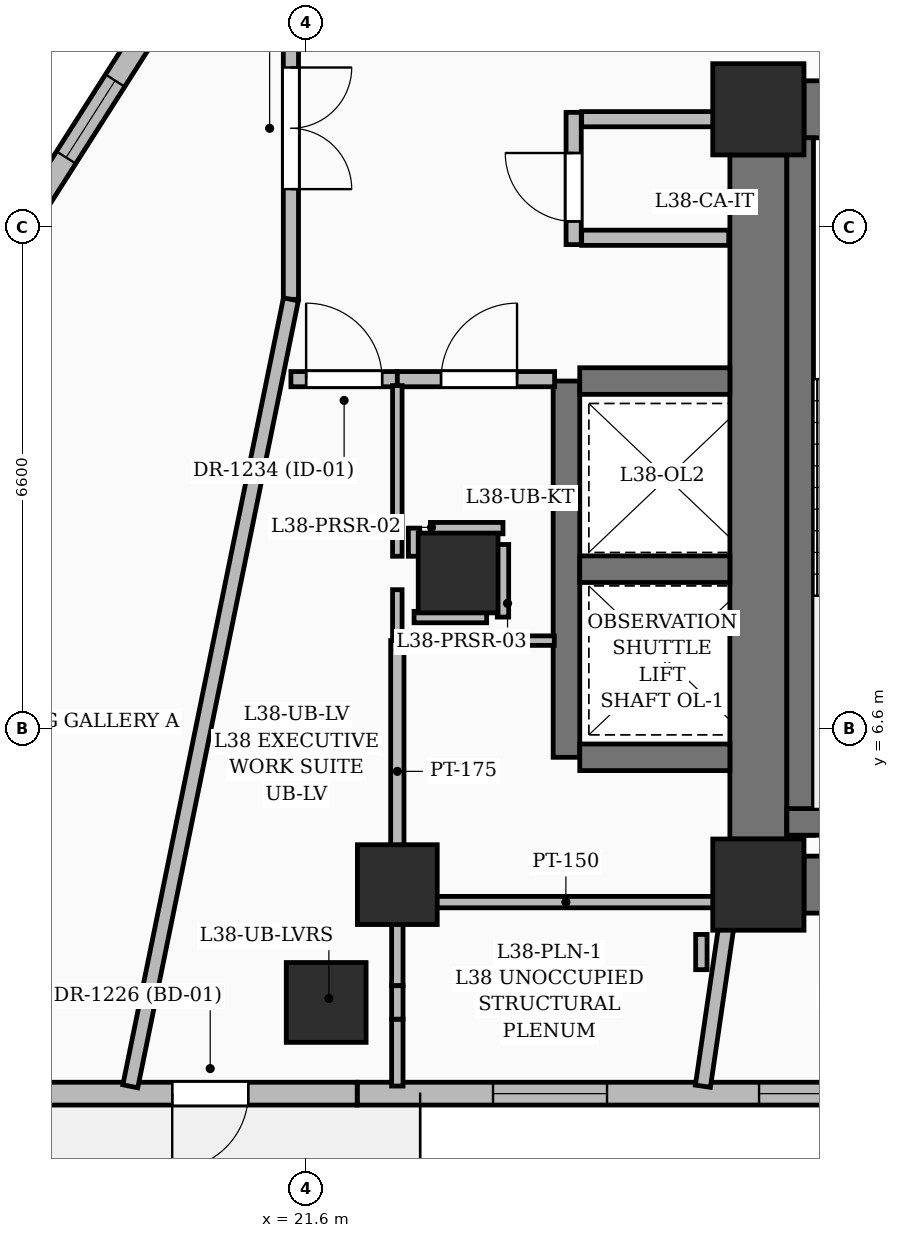
"""IFC4 building model, lengths in metres.
Left out: names, types, materials, properties, quantities, classifications, styles, units other than length and angle.
Written with IfcOpenShell. Run it as: python <this file> out.ifc"""

import sys

from ifc_helpers import new_model, si_unit, direction, frame, frame_2d, origin, origin_2d, place, context, subcontext, project, spatial, rectangle, extrude, element, fill, save


model = new_model("IFC4")
c1 = context("Model", 3, precision=1e-05, world=origin(), true_north=direction((0.0, 1.0)))
c2 = subcontext(c1, "Body", "Model", "MODEL_VIEW")
j1 = project(units=[si_unit("LENGTHUNIT", "METRE"), si_unit("PLANEANGLEUNIT", "RADIAN")], contexts=[c1])
p1 = place(None, origin())
s1 = spatial("IfcSite", under=j1, at=p1, CompositionType="ELEMENT")
p2 = place(p1, origin())
s2 = spatial("IfcBuilding", under=s1, at=p2, CompositionType="ELEMENT")
p3 = place(p2, frame((0.0, 0.0, 150.0)))
s3 = spatial("IfcBuildingStorey", under=s2, at=p3, CompositionType="ELEMENT", Elevation=150.0)
for number, where, z_axis, x_axis in (
    (1, (27.55, 4.55, 0.0), (0.0, 0.0, 1.0), (1.0, 0.0, 0.0)),
    (2, (27.55, 14.75, 0.0), (0.0, 0.0, 1.0), (1.0, 0.0, 0.0)),
):
    element("IfcColumn", number, at=place(p3, frame(where, z_axis=z_axis, x_axis=x_axis)), inside=s3, PredefinedType="COLUMN", context=c2, shape_type="SweptSolid", body=[
        extrude(rectangle(XDim=1.2, YDim=1.2, at=origin_2d()), origin(), (0.0, 0.0, 1.0), 3.6),
    ])
for number, where, z_axis, x_axis in (
    (3, (22.8, 4.55, 0.0), (0.0, 0.0, 1.0), (1.0, 0.0, 0.0)),
    (4, (23.6, 8.65, 0.0), (0.0, 0.0, 1.0), (1.0, 0.0, 0.0)),
):
    element("IfcColumn", number, at=place(p3, frame(where, z_axis=z_axis, x_axis=x_axis)), inside=s3, PredefinedType="COLUMN", context=c2, shape_type="SweptSolid", body=[
        extrude(rectangle(XDim=1.05, YDim=1.05, at=origin_2d()), origin(), (0.0, 0.0, 1.0), 3.6),
    ])
p4 = place(p3, frame((28.15, 4.55, 0.0), z_axis=(0.0, 0.0, 1.0), x_axis=(1.0, 0.0, 0.0)))
e5 = element("IfcWall", 5, at=p4, inside=s3, PredefinedType="SHEAR", context=c2, shape_type="SweptSolid", body=[
    extrude(rectangle(XDim=6.4, YDim=0.75, at=frame_2d((3.2, 0.0))), origin(), (0.0, 0.0, 1.0), 3.6),
])
p5 = place(p3, frame((28.15, 14.75, 0.0), z_axis=(0.0, 0.0, 1.0), x_axis=(1.0, 0.0, 0.0)))
e6 = element("IfcWall", 6, at=p5, inside=s3, PredefinedType="SHEAR", context=c2, shape_type="SweptSolid", body=[
    extrude(rectangle(XDim=6.4, YDim=0.75, at=frame_2d((3.2, 0.0))), origin(), (0.0, 0.0, 1.0), 3.6),
])
p6 = place(p5, frame((1.025, 0.0, 0.0)))
e7 = element("IfcOpeningElement", 7, at=p6, cuts=e6, PredefinedType="OPENING", context=c2, shape_type="SweptSolid", body=[
    extrude(rectangle(XDim=1.05, YDim=2.15, at=frame_2d((0.525, 1.075))), frame((0.0, 0.385, 0.0), z_axis=(0.0, -1.0, 0.0), x_axis=(1.0, 0.0, 0.0)), (0.0, 0.0, 1.0), 0.77),
])
p7 = place(p5, frame((3.8, 0.0, 0.0)))
e8 = element("IfcOpeningElement", 8, at=p7, cuts=e6, PredefinedType="OPENING", context=c2, shape_type="SweptSolid", body=[
    extrude(rectangle(XDim=1.1, YDim=2.2, at=frame_2d((0.55, 1.1))), frame((0.0, 0.385, 0.0), z_axis=(0.0, -1.0, 0.0), x_axis=(1.0, 0.0, 0.0)), (0.0, 0.0, 1.0), 0.77),
])
p8 = place(p3, frame((27.55, 5.15, 0.0), z_axis=(0.0, 0.0, 1.0), x_axis=(0.0, 1.0, 0.0)))
e9 = element("IfcWall", 9, at=p8, inside=s3, PredefinedType="SHEAR", context=c2, shape_type="SweptSolid", body=[
    extrude(rectangle(XDim=9.0, YDim=0.75, at=frame_2d((4.5, 0.0))), origin(), (0.0, 0.0, 1.0), 3.6),
])
p9 = place(p3, frame((28.1, 5.2, 0.0), z_axis=(0.0, 0.0, 1.0), x_axis=(0.0, 1.0, 0.0)))
e10 = element("IfcWall", 10, at=p9, inside=s3, PredefinedType="SOLIDWALL", context=c2, shape_type="SweptSolid", body=[
    extrude(rectangle(XDim=9.175, YDim=0.35, at=frame_2d((4.587, 0.0))), origin(), (0.0, 0.0, 1.0), 3.6),
])
p10 = place(p3, frame((27.925, 5.375, 0.0), z_axis=(0.0, 0.0, 1.0), x_axis=(1.0, 0.0, 0.0)))
e11 = element("IfcWall", 11, at=p10, inside=s3, PredefinedType="SOLIDWALL", context=c2, shape_type="SweptSolid", body=[
    extrude(rectangle(XDim=3.55, YDim=0.35, at=frame_2d((1.775, 0.0))), origin(), (0.0, 0.0, 1.0), 3.6),
])
p11 = place(p3, frame((25.025, 6.225, 0.0), z_axis=(0.0, 0.0, 1.0), x_axis=(0.0, 1.0, 0.0)))
e12 = element("IfcWall", 12, at=p11, inside=s3, PredefinedType="SOLIDWALL", context=c2, shape_type="SweptSolid", body=[
    extrude(rectangle(XDim=4.95, YDim=0.35, at=frame_2d((2.475, 0.0))), origin(), (0.0, 0.0, 1.0), 3.6),
])
for number, where, z_axis, x_axis in (
    (13, (25.2, 6.225, 0.0), (0.0, 0.0, 1.0), (1.0, 0.0, 0.0)),
    (14, (25.2, 8.7, 0.0), (0.0, 0.0, 1.0), (1.0, 0.0, 0.0)),
    (15, (25.2, 11.175, 0.0), (0.0, 0.0, 1.0), (1.0, 0.0, 0.0)),
):
    element("IfcWall", number, at=place(p3, frame(where, z_axis=z_axis, x_axis=x_axis)), inside=s3, PredefinedType="SOLIDWALL", context=c2, shape_type="SweptSolid", body=[
        extrude(rectangle(XDim=1.975, YDim=0.35, at=frame_2d((0.988, 0.0))), origin(), (0.0, 0.0, 1.0), 3.6),
    ])
p12 = place(p3, frame((21.864, 3.0, 0.0), z_axis=(0.0, 0.0, 1.0), x_axis=(1.0, 0.0, 0.0)))
e16 = element("IfcColumn", 16, at=p12, inside=s3, PredefinedType="COLUMN", context=c2, shape_type="SweptSolid", body=[
    extrude(rectangle(XDim=1.05, YDim=1.05, at=origin_2d()), origin(), (0.0, 0.0, 1.0), 3.6),
])
p13 = place(p3, frame((30.084, 1.8, 0.0), z_axis=(0.0, 0.0, 1.0), x_axis=(-1.0, 0.0, 0.0)))
e17 = element("IfcWall", 17, at=p13, inside=s3, PredefinedType="SOLIDWALL", context=c2, shape_type="SweptSolid", body=[
    extrude(rectangle(XDim=7.812, YDim=0.3, at=frame_2d((3.906, 0.0))), origin(), (0.0, 0.0, 1.0), 3.35),
])
p14 = place(p13, frame((4.525, 0.0, 0.6)))
e18 = element("IfcOpeningElement", 18, at=p14, cuts=e17, PredefinedType="OPENING", context=c2, shape_type="SweptSolid", body=[
    extrude(rectangle(XDim=1.5, YDim=2.1, at=frame_2d((0.75, 1.05))), frame((0.0, 0.16, 0.0), z_axis=(0.0, -1.0, 0.0), x_axis=(1.0, 0.0, 0.0)), (0.0, 0.0, 1.0), 0.32),
])
p15 = place(p13, frame((1.025, 0.0, 0.6)))
e19 = element("IfcOpeningElement", 19, at=p15, cuts=e17, PredefinedType="OPENING", context=c2, shape_type="SweptSolid", body=[
    extrude(rectangle(XDim=1.5, YDim=2.1, at=frame_2d((0.75, 1.05))), frame((0.0, 0.16, 0.0), z_axis=(0.0, -1.0, 0.0), x_axis=(1.0, 0.0, 0.0)), (0.0, 0.0, 1.0), 0.32),
])
p16 = place(p3, frame((22.272, 1.8, 0.0), z_axis=(0.0, 0.0, 1.0), x_axis=(-1.0, 0.0, 0.0)))
e20 = element("IfcWall", 20, at=p16, inside=s3, PredefinedType="SOLIDWALL", context=c2, shape_type="SweptSolid", body=[
    extrude(rectangle(XDim=7.812, YDim=0.3, at=frame_2d((3.906, 0.0))), origin(), (0.0, 0.0, 1.0), 3.35),
])
p17 = place(p16, frame((1.434, 0.0, 0.0)))
e21 = element("IfcOpeningElement", 21, at=p17, cuts=e20, PredefinedType="OPENING", context=c2, shape_type="SweptSolid", body=[
    extrude(rectangle(XDim=1.0, YDim=2.2, at=frame_2d((0.5, 1.1))), frame((0.0, 0.16, 0.0), z_axis=(0.0, -1.0, 0.0), x_axis=(1.0, 0.0, 0.0)), (0.0, 0.0, 1.0), 0.32),
])
p18 = place(p3, frame((17.006, 11.86, 0.0), z_axis=(0.0, 0.0, 1.0), x_axis=(0.537098524817, 0.843519516454, 0.0)))
e22 = element("IfcWall", 22, at=p18, inside=s3, PredefinedType="SOLIDWALL", context=c2, shape_type="SweptSolid", body=[
    extrude(rectangle(XDim=7.791, YDim=0.3, at=frame_2d((3.895, 0.0))), origin(), (0.0, 0.0, 1.0), 3.35),
])
p19 = place(p18, frame((2.675, 0.0, 0.8)))
e23 = element("IfcOpeningElement", 23, at=p19, cuts=e22, PredefinedType="OPENING", context=c2, shape_type="SweptSolid", body=[
    extrude(rectangle(XDim=1.2, YDim=1.8, at=frame_2d((0.6, 0.9))), frame((0.0, 0.16, 0.0), z_axis=(0.0, -1.0, 0.0), x_axis=(1.0, 0.0, 0.0)), (0.0, 0.0, 1.0), 0.32),
])
p20 = place(p3, frame((25.12, 12.97, 0.0), z_axis=(0.0, 0.0, 1.0), x_axis=(0.0, 1.0, 0.0)))
e24 = element("IfcWall", 24, at=p20, inside=s3, PredefinedType="PARTITIONING", context=c2, shape_type="SweptSolid", body=[
    extrude(rectangle(XDim=1.74, YDim=0.2, at=frame_2d((0.87, 0.0))), origin(), (0.0, 0.0, 1.0), 3.35),
])
p21 = place(p20, frame((0.305, 0.0, 0.0)))
e25 = element("IfcOpeningElement", 25, at=p21, cuts=e24, PredefinedType="OPENING", context=c2, shape_type="SweptSolid", body=[
    extrude(rectangle(XDim=0.9, YDim=2.1, at=frame_2d((0.45, 1.05))), frame((0.0, 0.11, 0.0), z_axis=(0.0, -1.0, 0.0), x_axis=(1.0, 0.0, 0.0)), (0.0, 0.0, 1.0), 0.22),
])
for number, where, z_axis, x_axis in (
    (26, (25.225, 14.62, 0.0), (0.0, 0.0, 1.0), (1.0, 0.0, 0.0)),
    (27, (25.225, 13.06, 0.0), (0.0, 0.0, 1.0), (1.0, 0.0, 0.0)),
):
    element("IfcWall", number, at=place(p3, frame(where, z_axis=z_axis, x_axis=x_axis)), inside=s3, PredefinedType="PARTITIONING", context=c2, shape_type="SweptSolid", body=[
        extrude(rectangle(XDim=1.935, YDim=0.2, at=frame_2d((0.967, 0.0))), origin(), (0.0, 0.0, 1.0), 3.35),
    ])
p22 = place(p3, frame((21.4, 16.75, 0.0), z_axis=(0.0, 0.0, 1.0), x_axis=(0.0, -1.0, 0.0)))
e28 = element("IfcWall", 28, at=p22, inside=s3, PredefinedType="PARTITIONING", context=c2, shape_type="SweptSolid", body=[
    extrude(rectangle(XDim=4.5, YDim=0.2, at=frame_2d((2.25, 0.0))), origin(), (0.0, 0.0, 1.0), 2.57),
])
p23 = place(p22, frame((1.45, 0.0, 0.0)))
e29 = element("IfcOpeningElement", 29, at=p23, cuts=e28, PredefinedType="OPENING", context=c2, shape_type="SweptSolid", body=[
    extrude(rectangle(XDim=1.6, YDim=2.3, at=frame_2d((0.8, 1.15))), frame((0.0, 0.11, 0.0), z_axis=(0.0, -1.0, 0.0), x_axis=(1.0, 0.0, 0.0)), (0.0, 0.0, 1.0), 0.22),
])
p24 = place(p3, frame((21.4, 11.2, 0.0), z_axis=(0.0, 0.0, 1.0), x_axis=(1.0, 0.0, 0.0)))
e30 = element("IfcWall", 30, at=p24, inside=s3, PredefinedType="PARTITIONING", context=c2, shape_type="SweptSolid", body=[
    extrude(rectangle(XDim=1.4, YDim=0.2, at=frame_2d((0.7, 0.0))), origin(), (0.0, 0.0, 1.0), 3.35),
])
p25 = place(p24, frame((0.2, 0.0, 0.0)))
e31 = element("IfcOpeningElement", 31, at=p25, cuts=e30, PredefinedType="OPENING", context=c2, shape_type="SweptSolid", body=[
    extrude(rectangle(XDim=1.0, YDim=2.2, at=frame_2d((0.5, 1.1))), frame((0.0, 0.11, 0.0), z_axis=(0.0, -1.0, 0.0), x_axis=(1.0, 0.0, 0.0)), (0.0, 0.0, 1.0), 0.22),
])
p26 = place(p3, frame((22.8, 11.2, 0.0), z_axis=(0.0, 0.0, 1.0), x_axis=(1.0, 0.0, 0.0)))
e32 = element("IfcWall", 32, at=p26, inside=s3, PredefinedType="PARTITIONING", context=c2, shape_type="SweptSolid", body=[
    extrude(rectangle(XDim=2.069, YDim=0.2, at=frame_2d((1.035, 0.0))), origin(), (0.0, 0.0, 1.0), 3.35),
])
p27 = place(p26, frame((0.575, 0.0, 0.0)))
e33 = element("IfcOpeningElement", 33, at=p27, cuts=e32, PredefinedType="OPENING", context=c2, shape_type="SweptSolid", body=[
    extrude(rectangle(XDim=1.0, YDim=2.2, at=frame_2d((0.5, 1.1))), frame((0.0, 0.11, 0.0), z_axis=(0.0, -1.0, 0.0), x_axis=(1.0, 0.0, 0.0)), (0.0, 0.0, 1.0), 0.22),
])
p28 = place(p3, frame((19.287, 1.897, 0.0), z_axis=(0.0, 0.0, 1.0), x_axis=(0.19995367442, 0.979805352142, 0.0)))
e34 = element("IfcWall", 34, at=p28, inside=s3, PredefinedType="PARTITIONING", context=c2, shape_type="SweptSolid", body=[
    extrude(rectangle(XDim=10.566, YDim=0.2, at=frame_2d((5.283, 0.0))), origin(), (0.0, 0.0, 1.0), 1.12),
])
p29 = place(p3, frame((22.8, 1.9, 0.0), z_axis=(0.0, 0.0, 1.0), x_axis=(0.0, 1.0, 0.0)))
e35 = element("IfcWall", 35, at=p29, inside=s3, PredefinedType="PARTITIONING", context=c2, shape_type="SweptSolid", body=[
    extrude(rectangle(XDim=0.88, YDim=0.15, at=frame_2d((0.44, 0.0))), origin(), (0.0, 0.0, 1.0), 1.12),
])
p30 = place(p3, frame((22.8, 3.22, 0.0), z_axis=(0.0, 0.0, 1.0), x_axis=(0.0, 1.0, 0.0)))
e36 = element("IfcWall", 36, at=p30, inside=s3, PredefinedType="PARTITIONING", context=c2, shape_type="SweptSolid", body=[
    extrude(rectangle(XDim=1.1, YDim=0.15, at=frame_2d((0.55, 0.0))), origin(), (0.0, 0.0, 1.0), 1.12),
])
p31 = place(p3, frame((22.8, 7.72, 0.0), z_axis=(0.0, 0.0, 1.0), x_axis=(0.0, 1.0, 0.0)))
e37 = element("IfcWall", 37, at=p31, inside=s3, PredefinedType="PARTITIONING", context=c2, shape_type="SweptSolid", body=[
    extrude(rectangle(XDim=0.71, YDim=0.125, at=frame_2d((0.355, 0.0))), origin(), (0.0, 0.0, 1.0), 1.12),
])
p32 = place(p3, frame((22.8, 8.87, 0.0), z_axis=(0.0, 0.0, 1.0), x_axis=(0.0, 1.0, 0.0)))
e38 = element("IfcWall", 38, at=p32, inside=s3, PredefinedType="PARTITIONING", context=c2, shape_type="SweptSolid", body=[
    extrude(rectangle(XDim=2.245, YDim=0.125, at=frame_2d((1.123, 0.0))), origin(), (0.0, 0.0, 1.0), 1.12),
])
p33 = place(p3, frame((22.8, 4.32, 0.0), z_axis=(0.0, 0.0, 1.0), x_axis=(0.0, 1.0, 0.0)))
e39 = element("IfcWall", 39, at=p33, inside=s3, PredefinedType="PARTITIONING", context=c2, shape_type="SweptSolid", body=[
    extrude(rectangle(XDim=3.44, YDim=0.175, at=frame_2d((1.72, 0.0))), origin(), (0.0, 0.0, 1.0), 3.35),
])
p34 = place(p3, frame((27.175, 4.32, 0.0), z_axis=(0.0, 0.0, 1.0), x_axis=(-1.0, 0.0, 0.0)))
e40 = element("IfcWall", 40, at=p34, inside=s3, PredefinedType="PARTITIONING", context=c2, shape_type="SweptSolid", body=[
    extrude(rectangle(XDim=4.315, YDim=0.15, at=frame_2d((2.157, 0.0))), origin(), (0.0, 0.0, 1.0), 2.436),
])
p35 = place(p3, frame((26.82, 1.898, 0.0), z_axis=(0.0, 0.0, 1.0), x_axis=(0.144970066801, 0.989436041254, 0.0)))
e41 = element("IfcWall", 41, at=p35, inside=s3, PredefinedType="PARTITIONING", context=c2, shape_type="SweptSolid", body=[
    extrude(rectangle(XDim=2.388, YDim=0.2, at=frame_2d((1.194, 0.0))), origin(), (0.0, 0.0, 1.0), 1.12),
])
p36 = place(p3, frame((22.847, 7.76, 0.0), z_axis=(0.0, 0.0, 1.0), x_axis=(1.0, 0.0, 0.0)))
e42 = element("IfcWall", 42, at=p36, inside=s3, PredefinedType="PARTITIONING", context=c2, shape_type="SweptSolid", body=[
    extrude(rectangle(XDim=2.018, YDim=0.125, at=frame_2d((1.009, 0.0))), origin(), (0.0, 0.0, 1.0), 3.35),
])
p37 = place(p3, frame((22.8, 3.22, 0.0), z_axis=(0.0, 0.0, 1.0), x_axis=(0.0, -1.0, 0.0)))
e43 = element("IfcWall", 43, at=p37, inside=s3, PredefinedType="PARTITIONING", context=c2, shape_type="SweptSolid", body=[
    extrude(rectangle(XDim=0.44, YDim=0.15, at=frame_2d((0.22, 0.0))), origin(), (0.0, 0.0, 1.0), 1.12),
])
p38 = place(p3, frame((26.8, 3.431, 0.0), z_axis=(0.0, 0.0, 1.0), x_axis=(0.0, 1.0, 0.0)))
e44 = element("IfcWall", 44, at=p38, inside=s3, PredefinedType="PARTITIONING", context=c2, shape_type="SweptSolid", body=[
    extrude(rectangle(XDim=0.464, YDim=0.15, at=frame_2d((0.232, 0.0))), origin(), (0.0, 0.0, 1.0), 1.12),
])
p39 = place(p3, frame((23.02, 8.87, 0.0), z_axis=(0.0, 0.0, 1.0), x_axis=(0.0, 1.0, 0.0)))
e45 = element("IfcWall", 45, at=p39, inside=s3, PredefinedType="PARTITIONING", context=c2, shape_type="SweptSolid", body=[
    extrude(rectangle(XDim=0.37, YDim=0.15, at=frame_2d((0.185, 0.0))), origin(), (0.0, 0.0, 1.0), 1.12),
])
for number, where, z_axis, x_axis in (
    (46, (23.235, 9.24, 0.0), (0.0, 0.0, 1.0), (1.0, 0.0, 0.0)),
    (47, (24.19, 9.025, 0.0), (0.0, 0.0, 1.0), (0.0, -1.0, 0.0)),
):
    element("IfcWall", number, at=place(p3, frame(where, z_axis=z_axis, x_axis=x_axis)), inside=s3, PredefinedType="PARTITIONING", context=c2, shape_type="SweptSolid", body=[
        extrude(rectangle(XDim=0.955, YDim=0.15, at=frame_2d((0.478, 0.0))), origin(), (0.0, 0.0, 1.0), 3.35),
    ])
p40 = place(p3, frame((23.975, 8.07, 0.0), z_axis=(0.0, 0.0, 1.0), x_axis=(-1.0, 0.0, 0.0)))
e48 = element("IfcWall", 48, at=p40, inside=s3, PredefinedType="PARTITIONING", context=c2, shape_type="SweptSolid", body=[
    extrude(rectangle(XDim=0.955, YDim=0.15, at=frame_2d((0.478, 0.0))), origin(), (0.0, 0.0, 1.0), 3.35),
])
p41 = place(p14, origin())
e49 = element("IfcWindow", 49, at=p41, inside=s3, PartitioningType="SINGLE_PANEL", PredefinedType="WINDOW", context=c2, shape_type="SweptSolid", body=[
    extrude(rectangle(XDim=1.5, YDim=2.1, at=frame_2d((0.75, 1.05))), frame((0.0, 0.03, 0.0), z_axis=(0.0, -1.0, 0.0), x_axis=(1.0, 0.0, 0.0)), (0.0, 0.0, 1.0), 0.06),
])
fill(e18, e49)
p42 = place(p15, origin())
e50 = element("IfcWindow", 50, at=p42, inside=s3, PartitioningType="SINGLE_PANEL", PredefinedType="WINDOW", context=c2, shape_type="SweptSolid", body=[
    extrude(rectangle(XDim=1.5, YDim=2.1, at=frame_2d((0.75, 1.05))), frame((0.0, 0.03, 0.0), z_axis=(0.0, -1.0, 0.0), x_axis=(1.0, 0.0, 0.0)), (0.0, 0.0, 1.0), 0.06),
])
fill(e19, e50)
p43 = place(p17, origin())
e51 = element("IfcDoor", 51, at=p43, inside=s3, OperationType="SINGLE_SWING_RIGHT", PredefinedType="DOOR", context=c2, shape_type="SweptSolid", body=[
    extrude(rectangle(XDim=1.0, YDim=2.2, at=frame_2d((0.5, 1.1))), frame((0.0, 0.025, 0.0), z_axis=(0.0, -1.0, 0.0), x_axis=(1.0, 0.0, 0.0)), (0.0, 0.0, 1.0), 0.05),
])
fill(e21, e51)
p44 = place(p19, origin())
e52 = element("IfcWindow", 52, at=p44, inside=s3, PartitioningType="SINGLE_PANEL", PredefinedType="WINDOW", context=c2, shape_type="SweptSolid", body=[
    extrude(rectangle(XDim=1.2, YDim=1.8, at=frame_2d((0.6, 0.9))), frame((0.0, 0.03, 0.0), z_axis=(0.0, -1.0, 0.0), x_axis=(1.0, 0.0, 0.0)), (0.0, 0.0, 1.0), 0.06),
])
fill(e23, e52)
p45 = place(p21, origin())
e53 = element("IfcDoor", 53, at=p45, inside=s3, OperationType="SINGLE_SWING_RIGHT", PredefinedType="DOOR", context=c2, shape_type="SweptSolid", body=[
    extrude(rectangle(XDim=0.9, YDim=2.1, at=frame_2d((0.45, 1.05))), frame((0.0, 0.025, 0.0), z_axis=(0.0, -1.0, 0.0), x_axis=(1.0, 0.0, 0.0)), (0.0, 0.0, 1.0), 0.05),
])
fill(e25, e53)
p46 = place(p23, origin())
e54 = element("IfcDoor", 54, at=p46, inside=s3, OperationType="DOUBLE_DOOR_SINGLE_SWING", PredefinedType="DOOR", context=c2, shape_type="SweptSolid", body=[
    extrude(rectangle(XDim=1.6, YDim=2.3, at=frame_2d((0.8, 1.15))), frame((0.0, 0.025, 0.0), z_axis=(0.0, -1.0, 0.0), x_axis=(1.0, 0.0, 0.0)), (0.0, 0.0, 1.0), 0.05),
])
fill(e29, e54)
p47 = place(p25, origin())
e55 = element("IfcDoor", 55, at=p47, inside=s3, OperationType="SINGLE_SWING_LEFT", PredefinedType="DOOR", context=c2, shape_type="SweptSolid", body=[
    extrude(rectangle(XDim=1.0, YDim=2.2, at=frame_2d((0.5, 1.1))), frame((0.0, 0.025, 0.0), z_axis=(0.0, -1.0, 0.0), x_axis=(1.0, 0.0, 0.0)), (0.0, 0.0, 1.0), 0.05),
])
fill(e31, e55)
p48 = place(p27, origin())
e56 = element("IfcDoor", 56, at=p48, inside=s3, OperationType="SINGLE_SWING_RIGHT", PredefinedType="DOOR", context=c2, shape_type="SweptSolid", body=[
    extrude(rectangle(XDim=1.0, YDim=2.2, at=frame_2d((0.5, 1.1))), frame((0.0, 0.025, 0.0), z_axis=(0.0, -1.0, 0.0), x_axis=(1.0, 0.0, 0.0)), (0.0, 0.0, 1.0), 0.05),
])
fill(e33, e56)
save(model, sys.argv[1])
